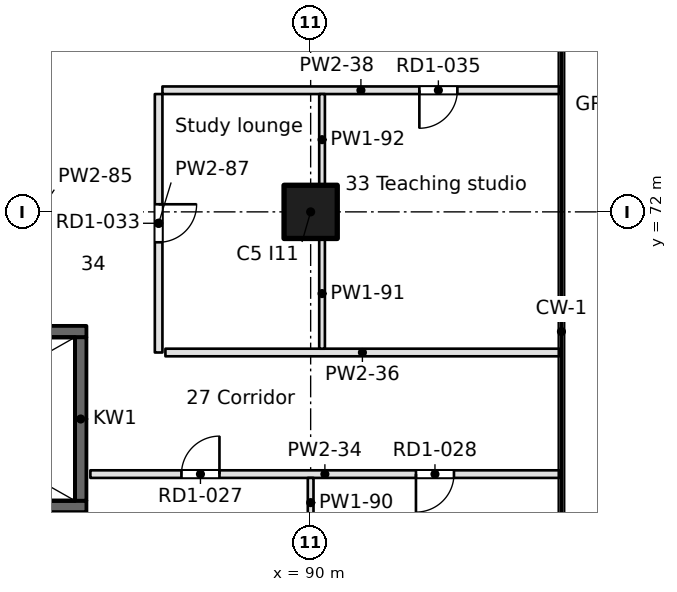
"""IFC4 building model, lengths in metres.
Left out: names, types, materials, properties, quantities, classifications, styles, units other than length and angle.
Written with IfcOpenShell. Run it as: python <this file> out.ifc"""

import sys

from ifc_helpers import new_model, si_unit, direction, frame, frame_2d, origin, origin_2d, place, context, subcontext, project, spatial, rectangle, extrude, element, fill, save


model = new_model("IFC4")
c1 = context("Model", 3, precision=1e-05, world=origin(), true_north=direction((0.0, 1.0)))
c2 = subcontext(c1, "Body", "Model", "MODEL_VIEW")
j1 = project(units=[si_unit("LENGTHUNIT", "METRE"), si_unit("PLANEANGLEUNIT", "RADIAN")], contexts=[c1])
p1 = place(None, origin())
s1 = spatial("IfcSite", under=j1, at=p1, CompositionType="ELEMENT")
p2 = place(p1, origin())
s2 = spatial("IfcBuilding", under=s1, at=p2, CompositionType="ELEMENT")
p3 = place(p2, frame((0.0, 0.0, 72.8)))
s3 = spatial("IfcBuildingStorey", under=s2, at=p3, CompositionType="ELEMENT", Elevation=72.8)
p4 = place(p3, frame((90.0, 72.0, 0.0), z_axis=(0.0, 0.0, 1.0), x_axis=(1.0, 0.0, 0.0)))
e1 = element("IfcColumn", 1, at=p4, inside=s3, PredefinedType="COLUMN", context=c2, shape_type="SweptSolid", body=[
    extrude(rectangle(XDim=1.4, YDim=1.4, at=origin_2d()), origin(), (0.0, 0.0, 1.0), 3.7),
])
for number, where, z_axis, x_axis in (
    (2, (75.9, 64.25, -0.4), (0.0, 0.0, 1.0), (1.0, 0.0, 0.0)),
    (3, (75.9, 68.85, -0.4), (0.0, 0.0, 1.0), (1.0, 0.0, 0.0)),
):
    element("IfcWall", number, at=place(p3, frame(where, z_axis=z_axis, x_axis=x_axis)), inside=s3, PredefinedType="SOLIDWALL", context=c2, shape_type="SweptSolid", body=[
        extrude(rectangle(XDim=8.2, YDim=0.3, at=frame_2d((4.1, 0.0))), origin(), (0.0, 0.0, 1.0), 3.7),
    ])
p5 = place(p3, frame((83.95, 64.4, -0.4), z_axis=(0.0, 0.0, 1.0), x_axis=(0.0, 1.0, 0.0)))
e4 = element("IfcWall", 4, at=p5, inside=s3, PredefinedType="SOLIDWALL", context=c2, shape_type="SweptSolid", body=[
    extrude(rectangle(XDim=4.3, YDim=0.3, at=frame_2d((2.15, 0.0))), origin(), (0.0, 0.0, 1.0), 3.7),
])
p6 = place(p3, frame((96.545, 65.1, 0.0), z_axis=(0.0, 0.0, 1.0), x_axis=(-1.0, 0.0, 0.0)))
e5 = element("IfcWall", 5, at=p6, inside=s3, PredefinedType="PARTITIONING", context=c2, shape_type="SweptSolid", body=[
    extrude(rectangle(XDim=12.341, YDim=0.2, at=frame_2d((6.17, 0.0))), origin(), (0.0, 0.0, 1.0), 3.3),
])
p7 = place(p6, frame((8.945, 0.0, 0.0)))
e6 = element("IfcOpeningElement", 6, at=p7, cuts=e5, PredefinedType="OPENING", context=c2, shape_type="SweptSolid", body=[
    extrude(rectangle(XDim=1.0, YDim=2.1, at=frame_2d((0.5, 1.05))), frame((0.0, 0.1, 0.0), z_axis=(0.0, -1.0, 0.0), x_axis=(1.0, 0.0, 0.0)), (0.0, 0.0, 1.0), 0.2),
])
p8 = place(p6, frame((2.774, 0.0, 0.0)))
e7 = element("IfcOpeningElement", 7, at=p8, cuts=e5, PredefinedType="OPENING", context=c2, shape_type="SweptSolid", body=[
    extrude(rectangle(XDim=1.0, YDim=2.1, at=frame_2d((0.5, 1.05))), frame((0.0, 0.1, 0.0), z_axis=(0.0, -1.0, 0.0), x_axis=(1.0, 0.0, 0.0)), (0.0, 0.0, 1.0), 0.2),
])
p9 = place(p3, frame((86.178, 68.3, 0.0), z_axis=(0.0, 0.0, 1.0), x_axis=(1.0, 0.0, 0.0)))
e8 = element("IfcWall", 8, at=p9, inside=s3, PredefinedType="PARTITIONING", context=c2, shape_type="SweptSolid", body=[
    extrude(rectangle(XDim=10.366, YDim=0.2, at=frame_2d((5.183, 0.0))), origin(), (0.0, 0.0, 1.0), 3.3),
])
p10 = place(p3, frame((96.545, 75.2, 0.0), z_axis=(0.0, 0.0, 1.0), x_axis=(-1.0, 0.0, 0.0)))
e9 = element("IfcWall", 9, at=p10, inside=s3, PredefinedType="PARTITIONING", context=c2, shape_type="SweptSolid", body=[
    extrude(rectangle(XDim=10.445, YDim=0.2, at=frame_2d((5.222, 0.0))), origin(), (0.0, 0.0, 1.0), 3.3),
])
p11 = place(p10, frame((2.685, 0.0, 0.0)))
e10 = element("IfcOpeningElement", 10, at=p11, cuts=e9, PredefinedType="OPENING", context=c2, shape_type="SweptSolid", body=[
    extrude(rectangle(XDim=1.0, YDim=2.1, at=frame_2d((0.5, 1.05))), frame((0.0, 0.1, 0.0), z_axis=(0.0, -1.0, 0.0), x_axis=(1.0, 0.0, 0.0)), (0.0, 0.0, 1.0), 0.2),
])
p12 = place(p3, frame((86.0, 75.1, 0.0), z_axis=(0.0, 0.0, 1.0), x_axis=(0.0, -1.0, 0.0)))
e11 = element("IfcWall", 11, at=p12, inside=s3, PredefinedType="PARTITIONING", context=c2, shape_type="SweptSolid", body=[
    extrude(rectangle(XDim=6.8, YDim=0.2, at=frame_2d((3.4, 0.0))), origin(), (0.0, 0.0, 1.0), 3.3),
])
p13 = place(p12, frame((2.9, 0.0, 0.0)))
e12 = element("IfcOpeningElement", 12, at=p13, cuts=e11, PredefinedType="OPENING", context=c2, shape_type="SweptSolid", body=[
    extrude(rectangle(XDim=1.0, YDim=2.1, at=frame_2d((0.5, 1.05))), frame((0.0, 0.1, 0.0), z_axis=(0.0, -1.0, 0.0), x_axis=(1.0, 0.0, 0.0)), (0.0, 0.0, 1.0), 0.2),
])
p14 = place(p3, frame((90.0, 65.0, 0.0), z_axis=(0.0, 0.0, 1.0), x_axis=(0.0, -1.0, 0.0)))
e13 = element("IfcWall", 13, at=p14, inside=s3, PredefinedType="PARTITIONING", context=c2, shape_type="SweptSolid", body=[
    extrude(rectangle(XDim=1.3, YDim=0.15, at=frame_2d((0.65, 0.0))), origin(), (0.0, 0.0, 1.0), 3.3),
])
p15 = place(p3, frame((90.3, 71.3, 0.0), z_axis=(0.0, 0.0, 1.0), x_axis=(0.0, -1.0, 0.0)))
e14 = element("IfcWall", 14, at=p15, inside=s3, PredefinedType="PARTITIONING", context=c2, shape_type="SweptSolid", body=[
    extrude(rectangle(XDim=2.9, YDim=0.15, at=frame_2d((1.45, 0.0))), origin(), (0.0, 0.0, 1.0), 3.3),
])
p16 = place(p3, frame((90.3, 75.1, 0.0), z_axis=(0.0, 0.0, 1.0), x_axis=(0.0, -1.0, 0.0)))
e15 = element("IfcWall", 15, at=p16, inside=s3, PredefinedType="PARTITIONING", context=c2, shape_type="SweptSolid", body=[
    extrude(rectangle(XDim=2.4, YDim=0.15, at=frame_2d((1.2, 0.0))), origin(), (0.0, 0.0, 1.0), 3.3),
])
p17 = place(p7, frame((1.0, 0.0, 0.0), z_axis=(0.0, 0.0, 1.0), x_axis=(-1.0, 0.0, 0.0)))
e16 = element("IfcDoor", 16, at=p17, inside=s3, OperationType="SINGLE_SWING_RIGHT", PredefinedType="DOOR", context=c2, shape_type="SweptSolid", body=[
    extrude(rectangle(XDim=1.0, YDim=2.1, at=frame_2d((0.5, 1.05))), frame((0.0, 0.025, 0.0), z_axis=(0.0, -1.0, 0.0), x_axis=(1.0, 0.0, 0.0)), (0.0, 0.0, 1.0), 0.05),
])
fill(e6, e16)
p18 = place(p8, origin())
e17 = element("IfcDoor", 17, at=p18, inside=s3, OperationType="SINGLE_SWING_RIGHT", PredefinedType="DOOR", context=c2, shape_type="SweptSolid", body=[
    extrude(rectangle(XDim=1.0, YDim=2.1, at=frame_2d((0.5, 1.05))), frame((0.0, 0.025, 0.0), z_axis=(0.0, -1.0, 0.0), x_axis=(1.0, 0.0, 0.0)), (0.0, 0.0, 1.0), 0.05),
])
fill(e7, e17)
p19 = place(p13, origin())
e18 = element("IfcDoor", 18, at=p19, inside=s3, OperationType="SINGLE_SWING_LEFT", PredefinedType="DOOR", context=c2, shape_type="SweptSolid", body=[
    extrude(rectangle(XDim=1.0, YDim=2.1, at=frame_2d((0.5, 1.05))), frame((0.0, 0.025, 0.0), z_axis=(0.0, -1.0, 0.0), x_axis=(1.0, 0.0, 0.0)), (0.0, 0.0, 1.0), 0.05),
])
fill(e12, e18)
p20 = place(p11, origin())
e19 = element("IfcDoor", 19, at=p20, inside=s3, OperationType="SINGLE_SWING_RIGHT", PredefinedType="DOOR", context=c2, shape_type="SweptSolid", body=[
    extrude(rectangle(XDim=1.0, YDim=2.1, at=frame_2d((0.5, 1.05))), frame((0.0, 0.025, 0.0), z_axis=(0.0, -1.0, 0.0), x_axis=(1.0, 0.0, 0.0)), (0.0, 0.0, 1.0), 0.05),
])
fill(e10, e19)
save(model, sys.argv[1])
